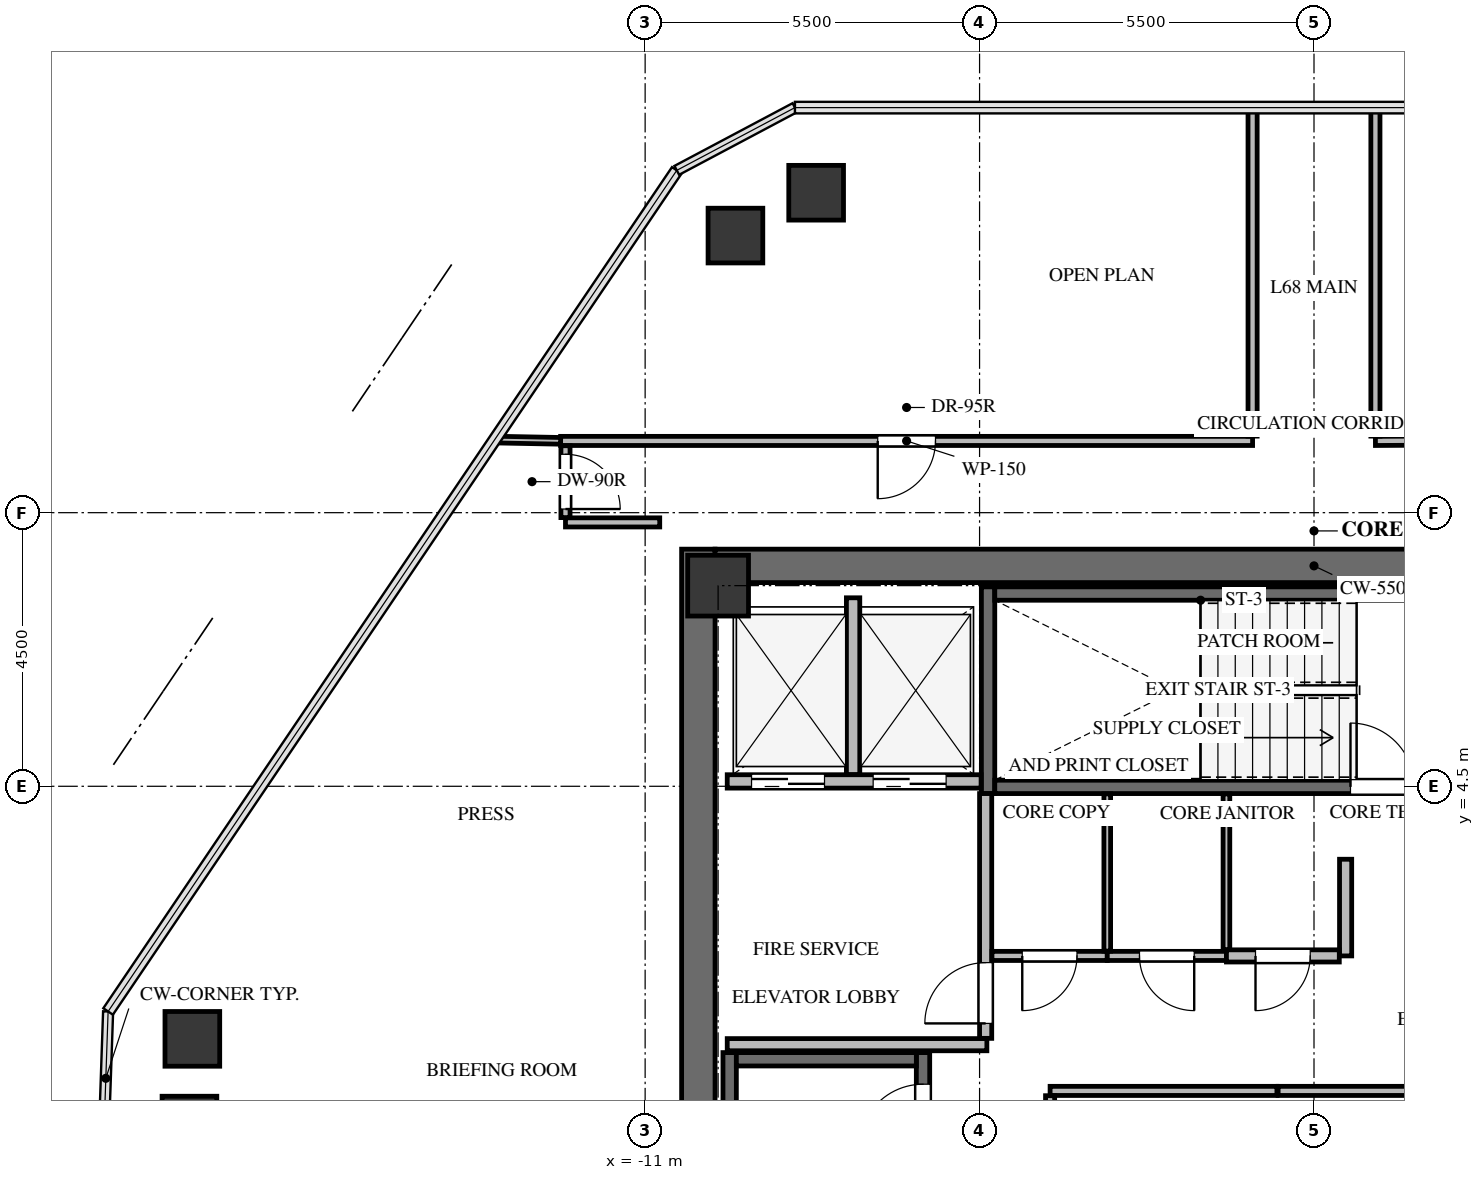
"""IFC4 building model, lengths in metres.
Left out: names, types, materials, properties, quantities, classifications, styles, units other than length and angle.
Written with IfcOpenShell. Run it as: python <this file> out.ifc"""

import sys

from ifc_helpers import new_model, si_unit, direction, frame, frame_2d, origin, origin_2d, place, context, subcontext, project, spatial, rectangle, extrude, source, transform, mapped, element, fill, save


model = new_model("IFC4")
c1 = context("Model", 3, precision=1e-05, world=origin(), true_north=direction((0.0, 1.0)))
c2 = subcontext(c1, "Body", "Model", "MODEL_VIEW")
j1 = project(units=[si_unit("LENGTHUNIT", "METRE"), si_unit("PLANEANGLEUNIT", "RADIAN")], contexts=[c1])
p1 = place(None, origin())
s1 = spatial("IfcSite", under=j1, at=p1, CompositionType="ELEMENT")
p2 = place(p1, origin())
s2 = spatial("IfcBuilding", under=s1, at=p2, CompositionType="ELEMENT")
p3 = place(p2, frame((0.0, 0.0, 244.7)))
s3 = spatial("IfcBuildingStorey", under=s2, at=p3, CompositionType="ELEMENT", Elevation=244.7)
p4 = place(p3, frame((-10.125, -8.4, 0.0), z_axis=(0.0, 0.0, 1.0), x_axis=(0.0, 1.0, 0.0)))
e1 = element("IfcWall", 1, at=p4, inside=s3, PredefinedType="SHEAR", context=c2, shape_type="SweptSolid", body=[
    extrude(rectangle(XDim=16.8, YDim=0.55, at=frame_2d((8.4, 0.0))), origin(), (0.0, 0.0, 1.0), 3.3),
])
p5 = place(p3, frame((-9.85, 8.125, 0.0), z_axis=(0.0, 0.0, 1.0), x_axis=(1.0, 0.0, 0.0)))
e2 = element("IfcWall", 2, at=p5, inside=s3, PredefinedType="SHEAR", context=c2, shape_type="SweptSolid", body=[
    extrude(rectangle(XDim=19.7, YDim=0.55, at=frame_2d((9.85, 0.0))), origin(), (0.0, 0.0, 1.0), 3.3),
])
p6 = place(p3, frame((-6.43, -7.77, -0.24), z_axis=(0.0, 0.0, 1.0), x_axis=(0.0, 1.0, 0.0)))
e3 = element("IfcWall", 3, at=p6, inside=s3, PredefinedType="SHEAR", context=c2, shape_type="SweptSolid", body=[
    extrude(rectangle(XDim=7.89, YDim=0.22, at=frame_2d((3.945, 0.0))), origin(), (0.0, 0.0, 1.0), 3.3),
])
p7 = place(p6, frame((6.32, 0.0, 0.0)))
e4 = element("IfcOpeningElement", 4, at=p7, cuts=e3, PredefinedType="OPENING", context=c2, shape_type="SweptSolid", body=[
    extrude(rectangle(XDim=1.05, YDim=2.15, at=frame_2d((0.525, 1.075))), frame((0.0, 0.12, 0.0), z_axis=(0.0, -1.0, 0.0), x_axis=(1.0, 0.0, 0.0)), (0.0, 0.0, 1.0), 0.24),
])
p8 = place(p3, frame((-9.61, 0.12, -0.24), z_axis=(0.0, 0.0, 1.0), x_axis=(0.0, -1.0, 0.0)))
e5 = element("IfcWall", 5, at=p8, inside=s3, PredefinedType="SHEAR", context=c2, shape_type="SweptSolid", body=[
    extrude(rectangle(XDim=7.89, YDim=0.22, at=frame_2d((3.945, 0.0))), origin(), (0.0, 0.0, 1.0), 3.3),
])
p9 = place(p3, frame((-6.54, 0.01, -0.24), z_axis=(0.0, 0.0, 1.0), x_axis=(-1.0, 0.0, 0.0)))
e6 = element("IfcWall", 6, at=p9, inside=s3, PredefinedType="SHEAR", context=c2, shape_type="SweptSolid", body=[
    extrude(rectangle(XDim=2.96, YDim=0.22, at=frame_2d((1.48, 0.0))), origin(), (0.0, 0.0, 1.0), 3.3),
])
p10 = place(p3, frame((-5.36, 7.78, -0.24), z_axis=(0.0, 0.0, 1.0), x_axis=(0.0, -1.0, 0.0)))
e7 = element("IfcWall", 7, at=p10, inside=s3, PredefinedType="SHEAR", context=c2, shape_type="SweptSolid", body=[
    extrude(rectangle(XDim=3.4, YDim=0.22, at=frame_2d((1.7, 0.0))), origin(), (0.0, 0.0, 1.0), 3.3),
])
p11 = place(p3, frame((-5.25, 4.49, -0.24), z_axis=(0.0, 0.0, 1.0), x_axis=(1.0, 0.0, 0.0)))
e8 = element("IfcWall", 8, at=p11, inside=s3, PredefinedType="SHEAR", context=c2, shape_type="SweptSolid", body=[
    extrude(rectangle(XDim=7.35, YDim=0.22, at=frame_2d((3.675, 0.0))), origin(), (0.0, 0.0, 1.0), 3.3),
])
p12 = place(p11, frame((5.85, 0.0, 0.0)))
e9 = element("IfcOpeningElement", 9, at=p12, cuts=e8, PredefinedType="OPENING", context=c2, shape_type="SweptSolid", body=[
    extrude(rectangle(XDim=1.05, YDim=2.15, at=frame_2d((0.525, 1.075))), frame((0.0, 0.12, 0.0), z_axis=(0.0, -1.0, 0.0), x_axis=(1.0, 0.0, 0.0)), (0.0, 0.0, 1.0), 0.24),
])
p13 = place(p3, frame((2.1, 7.67, -0.24), z_axis=(0.0, 0.0, 1.0), x_axis=(-1.0, 0.0, 0.0)))
e10 = element("IfcWall", 10, at=p13, inside=s3, PredefinedType="SHEAR", context=c2, shape_type="SweptSolid", body=[
    extrude(rectangle(XDim=7.35, YDim=0.22, at=frame_2d((3.675, 0.0))), origin(), (0.0, 0.0, 1.0), 3.3),
])
m1 = source(origin(), c2, "Body", "SweptSolid", [
    extrude(rectangle(XDim=1.0, YDim=1.0, at=origin_2d()), origin(), (0.0, 0.0, 1.0), 3.3),
])
p14 = place(p3, frame((-9.8, 7.8, -0.24), z_axis=(0.0, 0.0, 1.0), x_axis=(1.0, 0.0, 0.0)))
e11 = element("IfcColumn", 11, at=p14, inside=s3, PredefinedType="COLUMN", context=c2, shape_type="MappedRepresentation", body=[
    mapped(m1, transform((0.0, 0.0, 0.0), x_axis=(1.0, 0.0, 0.0), y_axis=(0.0, 1.0, 0.0), z_axis=(0.0, 0.0, 1.0), scale=1.0)),
])
m2 = source(origin(), c2, "Body", "SweptSolid", [
    extrude(rectangle(XDim=0.9, YDim=0.9, at=origin_2d()), origin(), (0.0, 0.0, 1.0), 3.3),
])
for number, where, z_axis, x_axis in (
    (12, (-18.494, -1.048, -0.24), (0.0, 0.0, 1.0), (1.0, 0.0, 0.0)),
    (13, (-18.446, 0.346, -0.24), (0.0, 0.0, 1.0), (1.0, 0.0, 0.0)),
    (14, (-9.515, 13.557, -0.24), (0.0, 0.0, 1.0), (1.0, 0.0, 0.0)),
    (15, (-8.188, 14.262, -0.24), (0.0, 0.0, 1.0), (1.0, 0.0, 0.0)),
):
    element("IfcColumn", number, at=place(p3, frame(where, z_axis=z_axis, x_axis=x_axis)), inside=s3, PredefinedType="COLUMN", context=c2, shape_type="MappedRepresentation", body=[
        mapped(m2, transform((0.0, 0.0, 0.0), x_axis=(1.0, 0.0, 0.0), y_axis=(0.0, 1.0, 0.0), z_axis=(0.0, 0.0, 1.0), scale=1.0)),
    ])
p15 = place(p3, frame((-9.65, 4.58, 0.0), z_axis=(0.0, 0.0, 1.0), x_axis=(1.0, 0.0, 0.0)))
e16 = element("IfcWall", 16, at=p15, inside=s3, PredefinedType="SOLIDWALL", context=c2, shape_type="SweptSolid", body=[
    extrude(rectangle(XDim=4.175, YDim=0.22, at=frame_2d((2.087, 0.0))), origin(), (0.0, 0.0, 1.0), 3.045),
])
p16 = place(p15, frame((0.4, 0.0, 0.0)))
e17 = element("IfcOpeningElement", 17, at=p16, cuts=e16, PredefinedType="OPENING", context=c2, shape_type="SweptSolid", body=[
    extrude(rectangle(XDim=1.2, YDim=2.15, at=frame_2d((0.6, 1.075))), frame((0.0, 0.12, 0.0), z_axis=(0.0, -1.0, 0.0), x_axis=(1.0, 0.0, 0.0)), (0.0, 0.0, 1.0), 0.24),
])
p17 = place(p15, frame((2.4, 0.0, 0.0)))
e18 = element("IfcOpeningElement", 18, at=p17, cuts=e16, PredefinedType="OPENING", context=c2, shape_type="SweptSolid", body=[
    extrude(rectangle(XDim=1.2, YDim=2.15, at=frame_2d((0.6, 1.075))), frame((0.0, 0.12, 0.0), z_axis=(0.0, -1.0, 0.0), x_axis=(1.0, 0.0, 0.0)), (0.0, 0.0, 1.0), 0.24),
])
p18 = place(p3, frame((-7.58, 4.694, 0.0), z_axis=(0.0, 0.0, 1.0), x_axis=(0.0, 1.0, 0.0)))
e19 = element("IfcWall", 19, at=p18, inside=s3, PredefinedType="SOLIDWALL", context=c2, shape_type="SweptSolid", body=[
    extrude(rectangle(XDim=2.906, YDim=0.22, at=frame_2d((1.453, 0.0))), origin(), (0.0, 0.0, 1.0), 3.045),
])
p19 = place(p3, frame((-9.65, 0.25, 0.0), z_axis=(0.0, 0.0, 1.0), x_axis=(1.0, 0.0, 0.0)))
e20 = element("IfcWall", 20, at=p19, inside=s3, PredefinedType="SOLIDWALL", context=c2, shape_type="SweptSolid", body=[
    extrude(rectangle(XDim=4.27, YDim=0.2, at=frame_2d((2.135, 0.0))), origin(), (0.0, 0.0, 1.0), 3.045),
])
p20 = place(p3, frame((-5.4, 0.354, 0.0), z_axis=(0.0, 0.0, 1.0), x_axis=(0.0, 1.0, 0.0)))
e21 = element("IfcWall", 21, at=p20, inside=s3, PredefinedType="SOLIDWALL", context=c2, shape_type="SweptSolid", body=[
    extrude(rectangle(XDim=4.026, YDim=0.2, at=frame_2d((2.013, 0.0))), origin(), (0.0, 0.0, 1.0), 3.045),
])
p21 = place(p20, frame((0.246, 0.0, 0.0)))
e22 = element("IfcOpeningElement", 22, at=p21, cuts=e21, PredefinedType="OPENING", context=c2, shape_type="SweptSolid", body=[
    extrude(rectangle(XDim=1.0, YDim=2.15, at=frame_2d((0.5, 1.075))), frame((0.0, 0.11, 0.0), z_axis=(0.0, -1.0, 0.0), x_axis=(1.0, 0.0, 0.0)), (0.0, 0.0, 1.0), 0.22),
])
p22 = place(p3, frame((-4.34, -0.51, 0.0), z_axis=(0.0, 0.0, 1.0), x_axis=(1.0, 0.0, 0.0)))
e23 = element("IfcWall", 23, at=p22, inside=s3, PredefinedType="PARTITIONING", context=c2, shape_type="SweptSolid", body=[
    extrude(rectangle(XDim=3.73, YDim=0.15, at=frame_2d((1.865, 0.0))), origin(), (0.0, 0.0, 1.0), 3.045),
])
p23 = place(p3, frame((-4.34, -2.961, 0.0), z_axis=(0.0, 0.0, 1.0), x_axis=(0.0, 1.0, 0.0)))
e24 = element("IfcWall", 24, at=p23, inside=s3, PredefinedType="PARTITIONING", context=c2, shape_type="SweptSolid", body=[
    extrude(rectangle(XDim=2.372, YDim=0.15, at=frame_2d((1.186, 0.0))), origin(), (0.0, 0.0, 1.0), 3.045),
])
p24 = place(p3, frame((-0.59, -0.51, 0.0), z_axis=(0.0, 0.0, 1.0), x_axis=(1.0, 0.0, 0.0)))
e25 = element("IfcWall", 25, at=p24, inside=s3, PredefinedType="PARTITIONING", context=c2, shape_type="SweptSolid", body=[
    extrude(rectangle(XDim=3.73, YDim=0.15, at=frame_2d((1.865, 0.0))), origin(), (0.0, 0.0, 1.0), 3.045),
])
p25 = place(p3, frame((-3.4, 1.71, 0.0), z_axis=(0.0, 0.0, 1.0), x_axis=(-1.0, 0.0, 0.0)))
e26 = element("IfcWall", 26, at=p25, inside=s3, PredefinedType="PARTITIONING", context=c2, shape_type="SweptSolid", body=[
    extrude(rectangle(XDim=1.896, YDim=0.15, at=frame_2d((0.948, 0.0))), origin(), (0.0, 0.0, 1.0), 3.045),
])
p26 = place(p25, frame((0.498, 0.0, 0.0)))
e27 = element("IfcOpeningElement", 27, at=p26, cuts=e26, PredefinedType="OPENING", context=c2, shape_type="SweptSolid", body=[
    extrude(rectangle(XDim=0.9, YDim=2.05, at=frame_2d((0.45, 1.025))), frame((0.0, 0.085, 0.0), z_axis=(0.0, -1.0, 0.0), x_axis=(1.0, 0.0, 0.0)), (0.0, 0.0, 1.0), 0.17),
])
p27 = place(p3, frame((-1.44, 1.71, 0.0), z_axis=(0.0, 0.0, 1.0), x_axis=(-1.0, 0.0, 0.0)))
e28 = element("IfcWall", 28, at=p27, inside=s3, PredefinedType="PARTITIONING", context=c2, shape_type="SweptSolid", body=[
    extrude(rectangle(XDim=1.96, YDim=0.15, at=frame_2d((0.98, 0.0))), origin(), (0.0, 0.0, 1.0), 3.045),
])
p28 = place(p27, frame((0.53, 0.0, 0.0)))
e29 = element("IfcOpeningElement", 29, at=p28, cuts=e28, PredefinedType="OPENING", context=c2, shape_type="SweptSolid", body=[
    extrude(rectangle(XDim=0.9, YDim=2.05, at=frame_2d((0.45, 1.025))), frame((0.0, 0.085, 0.0), z_axis=(0.0, -1.0, 0.0), x_axis=(1.0, 0.0, 0.0)), (0.0, 0.0, 1.0), 0.17),
])
p29 = place(p3, frame((0.52, 3.3, 0.0), z_axis=(0.0, 0.0, 1.0), x_axis=(0.0, -1.0, 0.0)))
e30 = element("IfcWall", 30, at=p29, inside=s3, PredefinedType="SOLIDWALL", context=c2, shape_type="SweptSolid", body=[
    extrude(rectangle(XDim=1.59, YDim=0.2, at=frame_2d((0.795, 0.0))), origin(), (0.0, 0.0, 1.0), 3.045),
])
p30 = place(p3, frame((0.416, 1.71, 0.0), z_axis=(0.0, 0.0, 1.0), x_axis=(-1.0, 0.0, 0.0)))
e31 = element("IfcWall", 31, at=p30, inside=s3, PredefinedType="SOLIDWALL", context=c2, shape_type="SweptSolid", body=[
    extrude(rectangle(XDim=1.856, YDim=0.2, at=frame_2d((0.928, 0.0))), origin(), (0.0, 0.0, 1.0), 3.045),
])
p31 = place(p30, frame((0.478, 0.0, 0.0)))
e32 = element("IfcOpeningElement", 32, at=p31, cuts=e31, PredefinedType="OPENING", context=c2, shape_type="SweptSolid", body=[
    extrude(rectangle(XDim=0.9, YDim=2.05, at=frame_2d((0.45, 1.025))), frame((0.0, 0.11, 0.0), z_axis=(0.0, -1.0, 0.0), x_axis=(1.0, 0.0, 0.0)), (0.0, 0.0, 1.0), 0.22),
])
p32 = place(p3, frame((-1.01, 10.18, 0.0), z_axis=(0.0, 0.0, 1.0), x_axis=(-1.0, 0.0, 0.0)))
e33 = element("IfcWall", 33, at=p32, inside=s3, PredefinedType="PARTITIONING", context=c2, shape_type="SweptSolid", body=[
    extrude(rectangle(XDim=11.38, YDim=0.15, at=frame_2d((5.69, 0.0))), origin(), (0.0, 0.0, 1.0), 2.301),
])
p33 = place(p32, frame((5.215, 0.0, 0.0)))
e34 = element("IfcOpeningElement", 34, at=p33, cuts=e33, PredefinedType="OPENING", context=c2, shape_type="SweptSolid", body=[
    extrude(rectangle(XDim=0.95, YDim=2.1, at=frame_2d((0.475, 1.05))), frame((0.0, 0.085, 0.0), z_axis=(0.0, -1.0, 0.0), x_axis=(1.0, 0.0, 0.0)), (0.0, 0.0, 1.0), 0.17),
])
p34 = place(p3, frame((-1.01, 15.662, 0.0), z_axis=(0.0, 0.0, 1.0), x_axis=(0.0, -1.0, 0.0)))
e35 = element("IfcWall", 35, at=p34, inside=s3, PredefinedType="PARTITIONING", context=c2, shape_type="SweptSolid", body=[
    extrude(rectangle(XDim=5.403, YDim=0.15, at=frame_2d((2.702, 0.0))), origin(), (0.0, 0.0, 1.0), 2.399),
])
p35 = place(p3, frame((12.368, 10.243, 0.0), z_axis=(0.0, 0.0, 1.0), x_axis=(-0.999984623931, -0.005545439622, 0.0)))
e36 = element("IfcWall", 36, at=p35, inside=s3, PredefinedType="PARTITIONING", context=c2, shape_type="SweptSolid", body=[
    extrude(rectangle(XDim=11.359, YDim=0.15, at=frame_2d((5.679, 0.0))), origin(), (0.0, 0.0, 1.0), 2.301),
])
p36 = place(p35, frame((5.219, 0.0, 0.0)))
e37 = element("IfcOpeningElement", 37, at=p36, cuts=e36, PredefinedType="OPENING", context=c2, shape_type="SweptSolid", body=[
    extrude(rectangle(XDim=0.92, YDim=2.1, at=frame_2d((0.46, 1.05))), frame((0.0, 0.085, 0.0), z_axis=(0.0, -1.0, 0.0), x_axis=(1.0, 0.0, 0.0)), (0.0, 0.0, 1.0), 0.17),
])
p37 = place(p3, frame((1.01, 10.259, 0.0), z_axis=(0.0, 0.0, 1.0), x_axis=(0.0, 1.0, 0.0)))
e38 = element("IfcWall", 38, at=p37, inside=s3, PredefinedType="PARTITIONING", context=c2, shape_type="SweptSolid", body=[
    extrude(rectangle(XDim=5.403, YDim=0.15, at=frame_2d((2.702, 0.0))), origin(), (0.0, 0.0, 1.0), 2.399),
])
p38 = place(p3, frame((-12.31, 8.84, 0.0), z_axis=(0.0, 0.0, 1.0), x_axis=(1.0, 0.0, 0.0)))
e39 = element("IfcWall", 39, at=p38, inside=s3, PredefinedType="PARTITIONING", context=c2, shape_type="SweptSolid", body=[
    extrude(rectangle(XDim=1.55, YDim=0.15, at=frame_2d((0.775, 0.0))), origin(), (0.0, 0.0, 1.0), 3.045),
])
p39 = place(p3, frame((-12.31, 10.101, 0.0), z_axis=(0.0, 0.0, 1.0), x_axis=(0.0, -1.0, 0.0)))
e40 = element("IfcWall", 40, at=p39, inside=s3, PredefinedType="PARTITIONING", context=c2, shape_type="SweptSolid", body=[
    extrude(rectangle(XDim=1.182, YDim=0.15, at=frame_2d((0.591, 0.0))), origin(), (0.0, 0.0, 1.0), 2.399),
])
p40 = place(p39, frame((0.141, 0.0, 0.0)))
e41 = element("IfcOpeningElement", 41, at=p40, cuts=e40, PredefinedType="OPENING", context=c2, shape_type="SweptSolid", body=[
    extrude(rectangle(XDim=0.9, YDim=2.05, at=frame_2d((0.45, 1.025))), frame((0.0, 0.085, 0.0), z_axis=(0.0, -1.0, 0.0), x_axis=(1.0, 0.0, 0.0)), (0.0, 0.0, 1.0), 0.17),
])
p41 = place(p3, frame((-3.4, 4.375, 0.0), z_axis=(0.0, 0.0, 1.0), x_axis=(0.0, -1.0, 0.0)))
e42 = element("IfcWall", 42, at=p41, inside=s3, PredefinedType="MOVABLE", context=c2, shape_type="SweptSolid", body=[
    extrude(rectangle(XDim=2.586, YDim=0.11, at=frame_2d((1.293, 0.0))), origin(), (0.0, 0.0, 1.0), 3.045),
])
p42 = place(p3, frame((-1.44, 4.375, 0.0), z_axis=(0.0, 0.0, 1.0), x_axis=(0.0, -1.0, 0.0)))
e43 = element("IfcWall", 43, at=p42, inside=s3, PredefinedType="MOVABLE", context=c2, shape_type="SweptSolid", body=[
    extrude(rectangle(XDim=2.561, YDim=0.11, at=frame_2d((1.281, 0.0))), origin(), (0.0, 0.0, 1.0), 3.045),
])
p43 = place(p3, frame((-12.39, 10.181, 0.0), z_axis=(0.0, 0.0, 1.0), x_axis=(-0.999812128272, 0.019383192748, 0.0)))
e44 = element("IfcWall", 44, at=p43, inside=s3, PredefinedType="MOVABLE", context=c2, shape_type="SweptSolid", body=[
    extrude(rectangle(XDim=1.083, YDim=0.11, at=frame_2d((0.542, 0.0))), origin(), (0.0, 0.0, 1.0), 3.045),
])
m3 = source(origin(), c2, "Body", "SweptSolid", [
    extrude(rectangle(XDim=1.05, YDim=2.15, at=frame_2d((0.525, 1.075))), frame((0.0, 0.025, 0.0), z_axis=(0.0, -1.0, 0.0), x_axis=(1.0, 0.0, 0.0)), (0.0, 0.0, 1.0), 0.05),
])
p44 = place(p7, origin())
e45 = element("IfcDoor", 45, at=p44, inside=s3, OperationType="SINGLE_SWING_LEFT", PredefinedType="DOOR", context=c2, shape_type="MappedRepresentation", body=[
    mapped(m3, transform((0.0, 0.0, 0.0), x_axis=(1.0, 0.0, 0.0), y_axis=(0.0, 1.0, 0.0), z_axis=(0.0, 0.0, 1.0), scale=1.0)),
])
fill(e4, e45)
p45 = place(p12, origin())
e46 = element("IfcDoor", 46, at=p45, inside=s3, OperationType="SINGLE_SWING_LEFT", PredefinedType="DOOR", context=c2, shape_type="MappedRepresentation", body=[
    mapped(m3, transform((0.0, 0.0, 0.0), x_axis=(1.0, 0.0, 0.0), y_axis=(0.0, 1.0, 0.0), z_axis=(0.0, 0.0, 1.0), scale=1.0)),
])
fill(e9, e46)
m4 = source(origin(), c2, "Body", "SweptSolid", [
    extrude(rectangle(XDim=1.2, YDim=2.15, at=frame_2d((0.6, 1.075))), frame((0.0, 0.025, 0.0), z_axis=(0.0, -1.0, 0.0), x_axis=(1.0, 0.0, 0.0)), (0.0, 0.0, 1.0), 0.05),
])
p46 = place(p16, origin())
e47 = element("IfcDoor", 47, at=p46, inside=s3, OperationType="DOUBLE_DOOR_SLIDING", PredefinedType="DOOR", context=c2, shape_type="MappedRepresentation", body=[
    mapped(m4, transform((0.0, 0.0, 0.0), x_axis=(1.0, 0.0, 0.0), y_axis=(0.0, 1.0, 0.0), z_axis=(0.0, 0.0, 1.0), scale=1.0)),
])
fill(e17, e47)
p47 = place(p17, origin())
e48 = element("IfcDoor", 48, at=p47, inside=s3, OperationType="DOUBLE_DOOR_SLIDING", PredefinedType="DOOR", context=c2, shape_type="MappedRepresentation", body=[
    mapped(m4, transform((0.0, 0.0, 0.0), x_axis=(1.0, 0.0, 0.0), y_axis=(0.0, 1.0, 0.0), z_axis=(0.0, 0.0, 1.0), scale=1.0)),
])
fill(e18, e48)
m5 = source(origin(), c2, "Body", "SweptSolid", [
    extrude(rectangle(XDim=1.0, YDim=2.15, at=frame_2d((0.5, 1.075))), frame((0.0, 0.025, 0.0), z_axis=(0.0, -1.0, 0.0), x_axis=(1.0, 0.0, 0.0)), (0.0, 0.0, 1.0), 0.05),
])
p48 = place(p21, origin())
e49 = element("IfcDoor", 49, at=p48, inside=s3, OperationType="SINGLE_SWING_LEFT", PredefinedType="DOOR", context=c2, shape_type="MappedRepresentation", body=[
    mapped(m5, transform((0.0, 0.0, 0.0), x_axis=(1.0, 0.0, 0.0), y_axis=(0.0, 1.0, 0.0), z_axis=(0.0, 0.0, 1.0), scale=1.0)),
])
fill(e22, e49)
m6 = source(origin(), c2, "Body", "SweptSolid", [
    extrude(rectangle(XDim=0.9, YDim=2.05, at=frame_2d((0.45, 1.025))), frame((0.0, 0.025, 0.0), z_axis=(0.0, -1.0, 0.0), x_axis=(1.0, 0.0, 0.0)), (0.0, 0.0, 1.0), 0.05),
])
p49 = place(p26, origin())
e50 = element("IfcDoor", 50, at=p49, inside=s3, OperationType="SINGLE_SWING_RIGHT", PredefinedType="DOOR", context=c2, shape_type="MappedRepresentation", body=[
    mapped(m6, transform((0.0, 0.0, 0.0), x_axis=(1.0, 0.0, 0.0), y_axis=(0.0, 1.0, 0.0), z_axis=(0.0, 0.0, 1.0), scale=1.0)),
])
fill(e27, e50)
m7 = source(origin(), c2, "Body", "SweptSolid", [
    extrude(rectangle(XDim=0.9, YDim=2.05, at=frame_2d((0.45, 1.025))), frame((0.0, 0.025, 0.0), z_axis=(0.0, -1.0, 0.0), x_axis=(1.0, 0.0, 0.0)), (0.0, 0.0, 1.0), 0.05),
])
p50 = place(p28, origin())
e51 = element("IfcDoor", 51, at=p50, inside=s3, OperationType="SINGLE_SWING_LEFT", PredefinedType="DOOR", context=c2, shape_type="MappedRepresentation", body=[
    mapped(m7, transform((0.0, 0.0, 0.0), x_axis=(1.0, 0.0, 0.0), y_axis=(0.0, 1.0, 0.0), z_axis=(0.0, 0.0, 1.0), scale=1.0)),
])
fill(e29, e51)
p51 = place(p31, origin())
e52 = element("IfcDoor", 52, at=p51, inside=s3, OperationType="SINGLE_SWING_RIGHT", PredefinedType="DOOR", context=c2, shape_type="MappedRepresentation", body=[
    mapped(m6, transform((0.0, 0.0, 0.0), x_axis=(1.0, 0.0, 0.0), y_axis=(0.0, 1.0, 0.0), z_axis=(0.0, 0.0, 1.0), scale=1.0)),
])
fill(e32, e52)
m8 = source(origin(), c2, "Body", "SweptSolid", [
    extrude(rectangle(XDim=0.95, YDim=2.1, at=frame_2d((0.475, 1.05))), frame((0.0, 0.025, 0.0), z_axis=(0.0, -1.0, 0.0), x_axis=(1.0, 0.0, 0.0)), (0.0, 0.0, 1.0), 0.05),
])
p52 = place(p33, origin())
e53 = element("IfcDoor", 53, at=p52, inside=s3, OperationType="SINGLE_SWING_RIGHT", PredefinedType="DOOR", context=c2, shape_type="MappedRepresentation", body=[
    mapped(m8, transform((0.0, 0.0, 0.0), x_axis=(1.0, 0.0, 0.0), y_axis=(0.0, 1.0, 0.0), z_axis=(0.0, 0.0, 1.0), scale=1.0)),
])
fill(e34, e53)
m9 = source(origin(), c2, "Body", "SweptSolid", [
    extrude(rectangle(XDim=0.9, YDim=2.05, at=frame_2d((0.45, 1.025))), frame((0.0, 0.025, 0.0), z_axis=(0.0, -1.0, 0.0), x_axis=(1.0, 0.0, 0.0)), (0.0, 0.0, 1.0), 0.05),
])
p53 = place(p40, origin())
e54 = element("IfcDoor", 54, at=p53, inside=s3, OperationType="SINGLE_SWING_RIGHT", PredefinedType="DOOR", context=c2, shape_type="MappedRepresentation", body=[
    mapped(m9, transform((0.0, 0.0, 0.0), x_axis=(1.0, 0.0, 0.0), y_axis=(0.0, 1.0, 0.0), z_axis=(0.0, 0.0, 1.0), scale=1.0)),
])
fill(e41, e54)
save(model, sys.argv[1])
